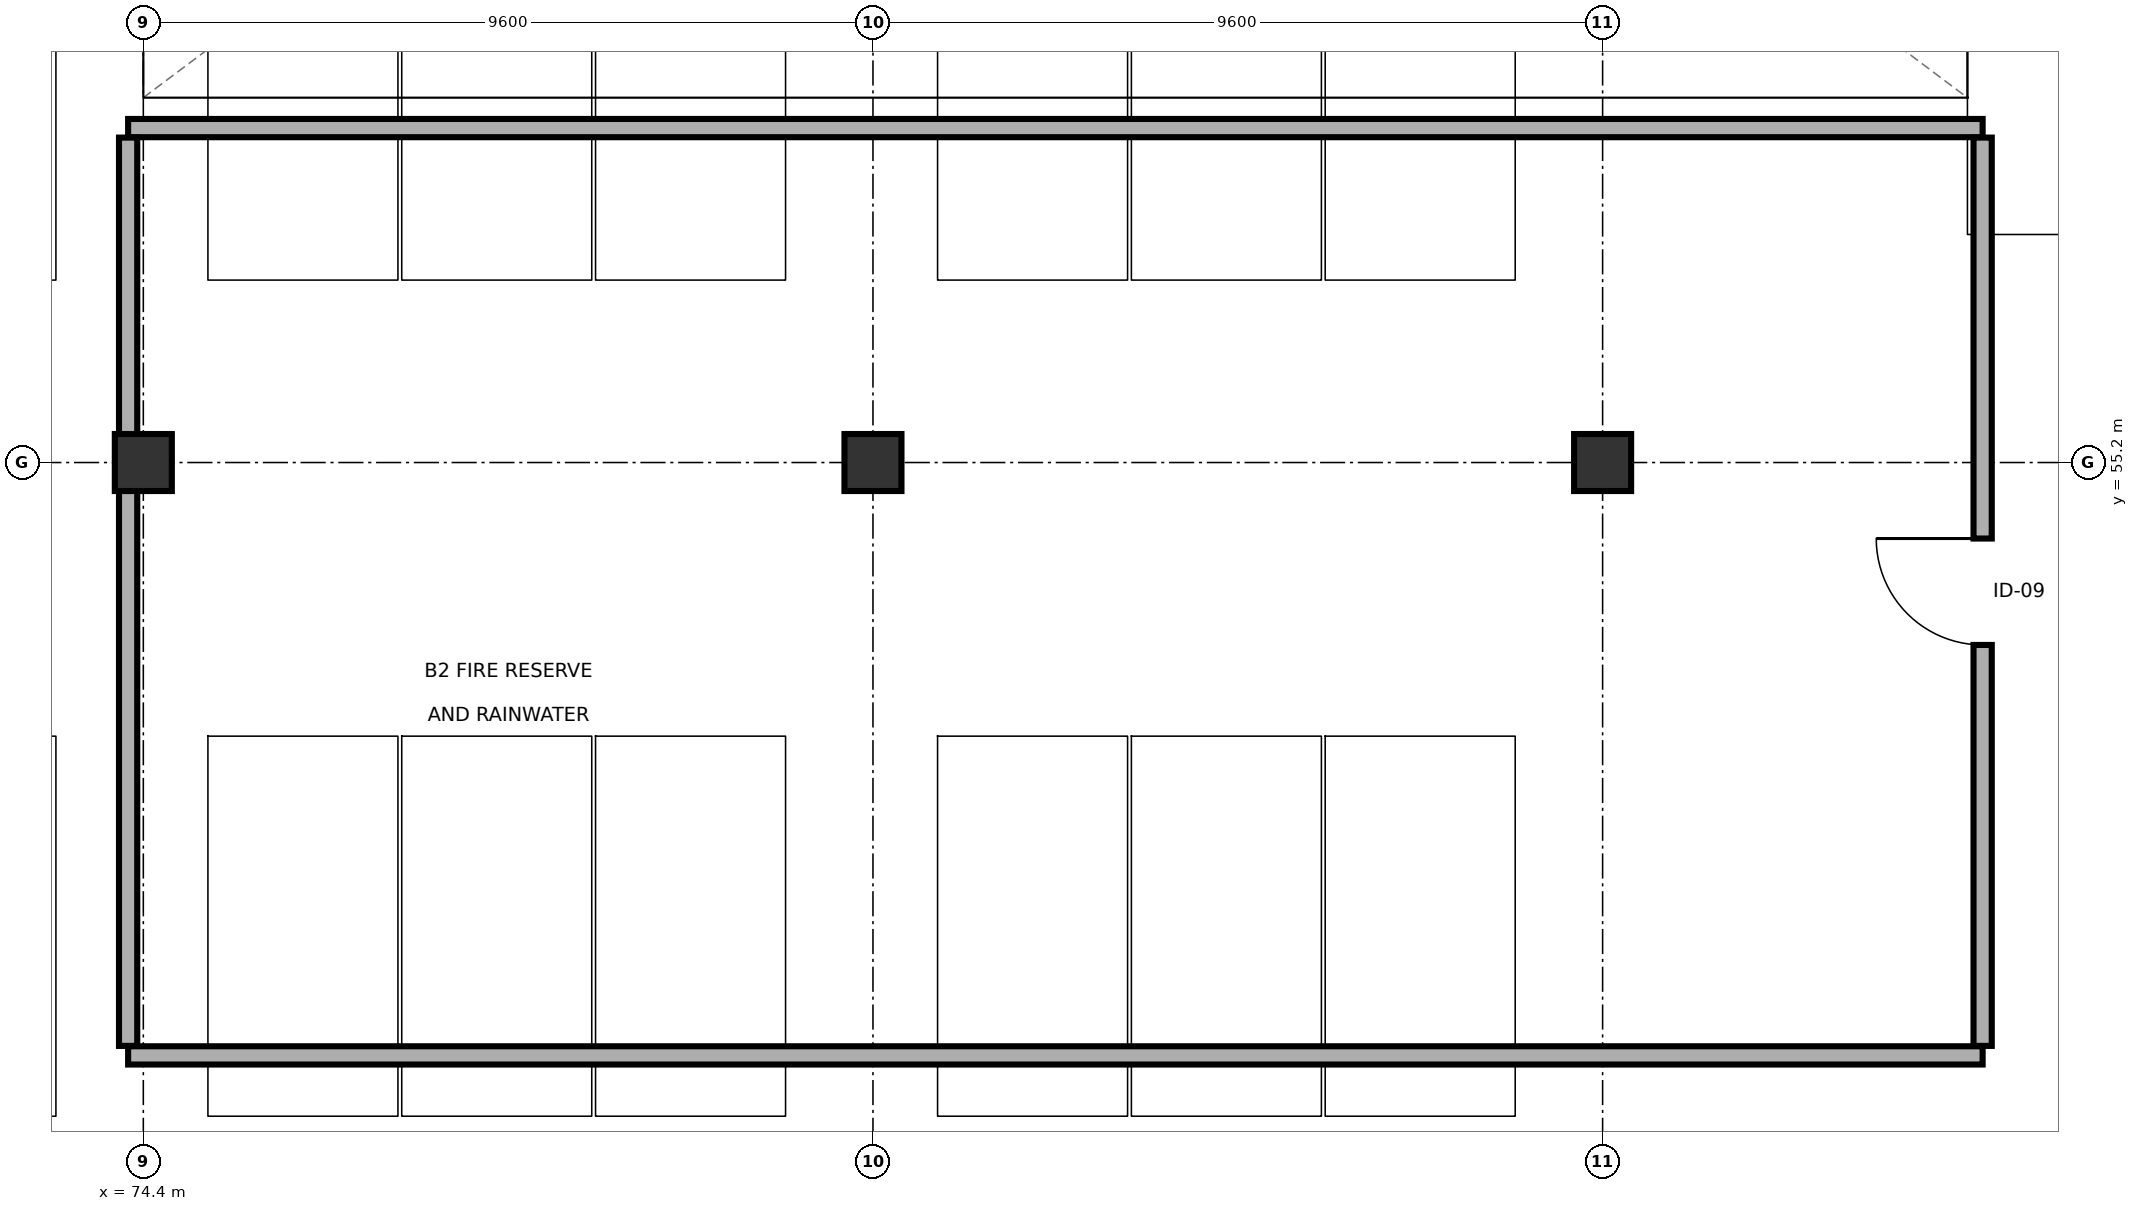
"""IFC4 building model, lengths in metres.
Left out: names, types, materials, properties, quantities, classifications, styles, units other than length and angle.
Written with IfcOpenShell. Run it as: python <this file> out.ifc"""

import sys

from ifc_helpers import new_model, si_unit, direction, frame, frame_2d, origin, origin_2d, place, context, subcontext, project, spatial, rectangle, extrude, element, fill, save


model = new_model("IFC4")
c1 = context("Model", 3, precision=1e-05, world=origin(), true_north=direction((0.0, 1.0)))
c2 = subcontext(c1, "Body", "Model", "MODEL_VIEW")
j1 = project(units=[si_unit("LENGTHUNIT", "METRE"), si_unit("PLANEANGLEUNIT", "RADIAN")], contexts=[c1])
p1 = place(None, origin())
s1 = spatial("IfcSite", under=j1, at=p1, CompositionType="ELEMENT")
p2 = place(p1, origin())
s2 = spatial("IfcBuilding", under=s1, at=p2, CompositionType="ELEMENT")
p3 = place(p2, frame((0.0, 0.0, -8.4)))
s3 = spatial("IfcBuildingStorey", under=s2, at=p3, CompositionType="ELEMENT", Elevation=-8.4)
for number, where, z_axis, x_axis in (
    (1, (74.4, 55.2, 0.0), (0.0, 0.0, 1.0), (1.0, 0.0, 0.0)),
    (2, (84.0, 55.2, 0.0), (0.0, 0.0, 1.0), (1.0, 0.0, 0.0)),
    (3, (93.6, 55.2, 0.0), (0.0, 0.0, 1.0), (1.0, 0.0, 0.0)),
):
    element("IfcColumn", number, at=place(p3, frame(where, z_axis=z_axis, x_axis=x_axis)), inside=s3, PredefinedType="COLUMN", context=c2, shape_type="SweptSolid", body=[
        extrude(rectangle(XDim=0.75, YDim=0.75, at=origin_2d()), origin(), (0.0, 0.0, 1.0), 4.2),
    ])
p4 = place(p3, frame((74.2, 47.4, 0.0), z_axis=(0.0, 0.0, 1.0), x_axis=(1.0, 0.0, 0.0)))
e4 = element("IfcWall", 4, at=p4, inside=s3, PredefinedType="SOLIDWALL", context=c2, shape_type="SweptSolid", body=[
    extrude(rectangle(XDim=24.4, YDim=0.24, at=frame_2d((12.2, 0.0))), origin(), (0.0, 0.0, 1.0), 3.415),
])
p5 = place(p3, frame((74.2, 59.6, 0.0), z_axis=(0.0, 0.0, 1.0), x_axis=(1.0, 0.0, 0.0)))
e5 = element("IfcWall", 5, at=p5, inside=s3, PredefinedType="SOLIDWALL", context=c2, shape_type="SweptSolid", body=[
    extrude(rectangle(XDim=24.4, YDim=0.24, at=frame_2d((12.2, 0.0))), origin(), (0.0, 0.0, 1.0), 3.93),
])
p6 = place(p3, frame((74.2, 47.525, 0.0), z_axis=(0.0, 0.0, 1.0), x_axis=(0.0, 1.0, 0.0)))
e6 = element("IfcWall", 6, at=p6, inside=s3, PredefinedType="SOLIDWALL", context=c2, shape_type="SweptSolid", body=[
    extrude(rectangle(XDim=11.95, YDim=0.24, at=frame_2d((5.975, 0.0))), origin(), (0.0, 0.0, 1.0), 3.415),
])
p7 = place(p3, frame((98.6, 47.525, 0.0), z_axis=(0.0, 0.0, 1.0), x_axis=(0.0, 1.0, 0.0)))
e7 = element("IfcWall", 7, at=p7, inside=s3, PredefinedType="SOLIDWALL", context=c2, shape_type="SweptSolid", body=[
    extrude(rectangle(XDim=11.95, YDim=0.24, at=frame_2d((5.975, 0.0))), origin(), (0.0, 0.0, 1.0), 3.475),
])
p8 = place(p7, frame((5.275, 0.0, 0.0)))
e8 = element("IfcOpeningElement", 8, at=p8, cuts=e7, PredefinedType="OPENING", context=c2, shape_type="SweptSolid", body=[
    extrude(rectangle(XDim=1.4, YDim=2.2, at=frame_2d((0.7, 1.1))), frame((0.0, 0.13, 0.0), z_axis=(0.0, -1.0, 0.0), x_axis=(1.0, 0.0, 0.0)), (0.0, 0.0, 1.0), 0.26),
])
p9 = place(p8, origin())
e9 = element("IfcDoor", 9, at=p9, inside=s3, OperationType="SINGLE_SWING_RIGHT", PredefinedType="DOOR", context=c2, shape_type="SweptSolid", body=[
    extrude(rectangle(XDim=1.4, YDim=2.2, at=frame_2d((0.7, 1.1))), frame((0.0, 0.025, 0.0), z_axis=(0.0, -1.0, 0.0), x_axis=(1.0, 0.0, 0.0)), (0.0, 0.0, 1.0), 0.05),
])
fill(e8, e9)
save(model, sys.argv[1])
